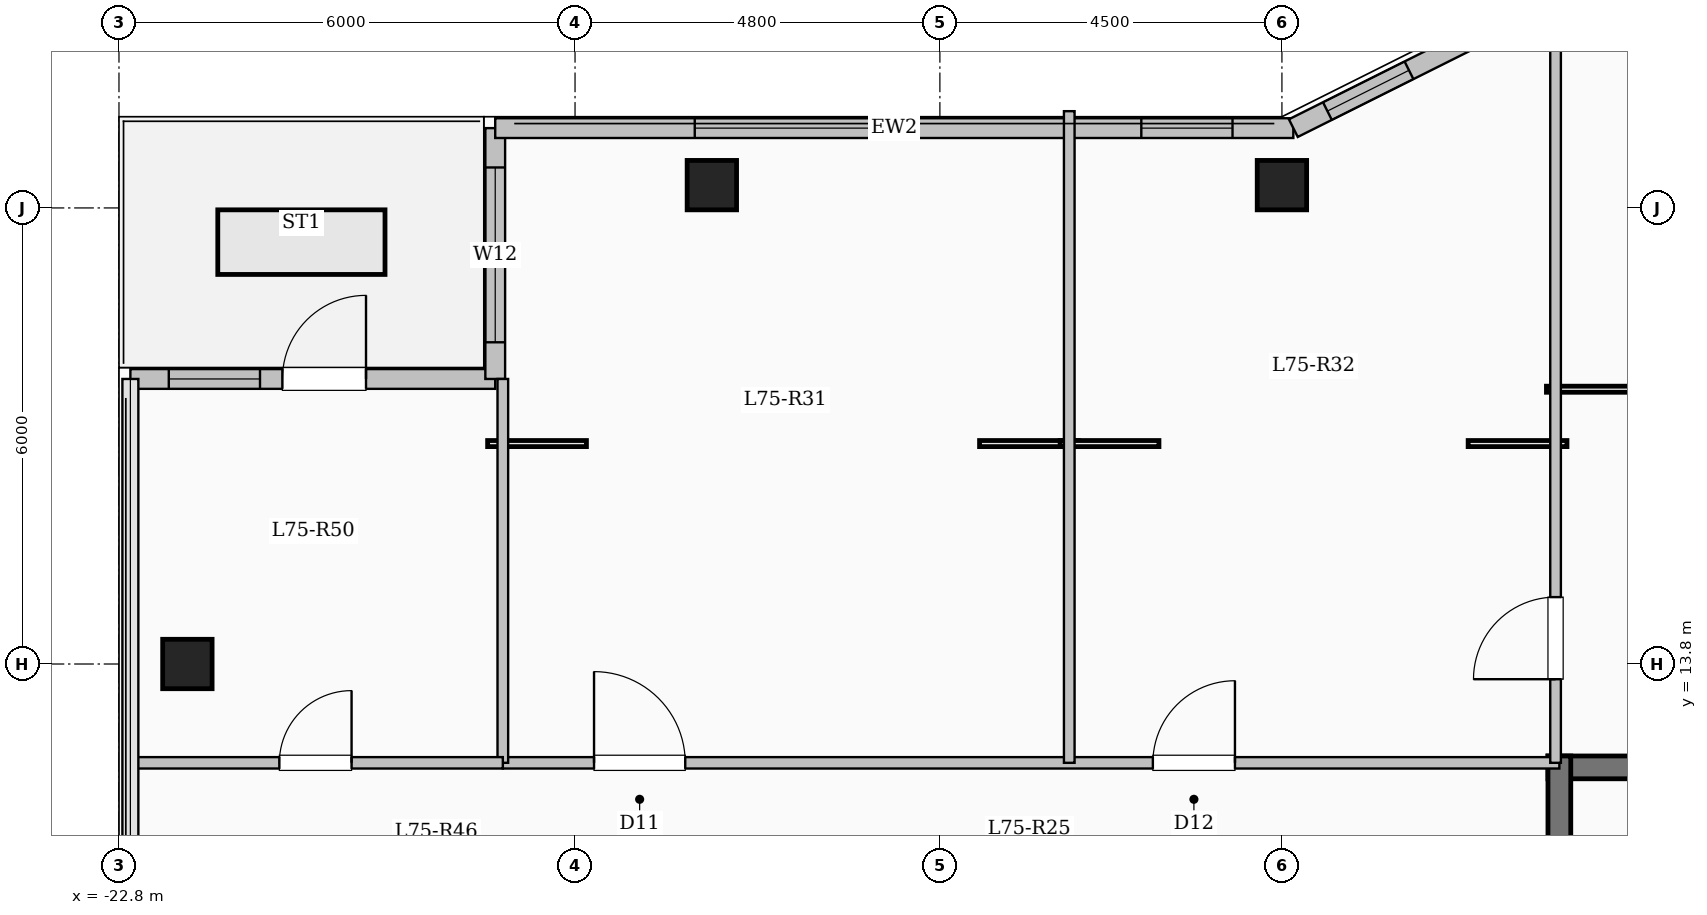
"""IFC4 building model, lengths in metres.
Left out: names, types, materials, properties, quantities, classifications, styles, units other than length and angle.
Written with IfcOpenShell. Run it as: python <this file> out.ifc"""

import sys

from ifc_helpers import new_model, si_unit, direction, frame, frame_2d, origin, origin_2d, place, context, subcontext, project, spatial, rectangle, extrude, element, fill, save


model = new_model("IFC4")
c1 = context("Model", 3, precision=1e-05, world=origin(), true_north=direction((0.0, 1.0)))
c2 = subcontext(c1, "Body", "Model", "MODEL_VIEW")
j1 = project(units=[si_unit("LENGTHUNIT", "METRE"), si_unit("PLANEANGLEUNIT", "RADIAN")], contexts=[c1])
p1 = place(None, origin())
s1 = spatial("IfcSite", under=j1, at=p1, CompositionType="ELEMENT")
p2 = place(p1, origin())
s2 = spatial("IfcBuilding", under=s1, at=p2, CompositionType="ELEMENT")
p3 = place(p2, frame((0.0, 0.0, 276.3)))
s3 = spatial("IfcBuildingStorey", under=s2, at=p3, CompositionType="ELEMENT", Elevation=276.3)
for number, where, z_axis, x_axis in (
    (1, (-15.0, 20.1, 0.0), (0.0, 0.0, 1.0), (1.0, 0.0, 0.0)),
    (2, (-7.5, 20.1, 0.0), (0.0, 0.0, 1.0), (1.0, 0.0, 0.0)),
    (3, (-21.9, 13.8, 0.0), (0.0, 0.0, 1.0), (1.0, 0.0, 0.0)),
):
    element("IfcColumn", number, at=place(p3, frame(where, z_axis=z_axis, x_axis=x_axis)), inside=s3, PredefinedType="COLUMN", context=c2, shape_type="SweptSolid", body=[
        extrude(rectangle(XDim=0.65, YDim=0.65, at=origin_2d()), origin(), (0.0, 0.0, 1.0), 5.25),
    ])
p4 = place(p3, frame((-22.65, 17.55, 0.0), z_axis=(0.0, 0.0, 1.0), x_axis=(1.0, 0.0, 0.0)))
e4 = element("IfcWall", 4, at=p4, inside=s3, PredefinedType="SOLIDWALL", context=c2, shape_type="SweptSolid", body=[
    extrude(rectangle(XDim=4.8, YDim=0.26, at=frame_2d((2.4, 0.0))), origin(), (0.0, 0.0, 1.0), 4.95),
])
p5 = place(p4, frame((2.0, 0.0, 0.0)))
e5 = element("IfcOpeningElement", 5, at=p5, cuts=e4, PredefinedType="OPENING", context=c2, shape_type="SweptSolid", body=[
    extrude(rectangle(XDim=1.1, YDim=2.2, at=frame_2d((0.55, 1.1))), frame((0.0, 0.14, 0.0), z_axis=(0.0, -1.0, 0.0), x_axis=(1.0, 0.0, 0.0)), (0.0, 0.0, 1.0), 0.28),
])
p6 = place(p4, frame((0.505, 0.0, 0.95)))
e6 = element("IfcOpeningElement", 6, at=p6, cuts=e4, PredefinedType="OPENING", context=c2, shape_type="SweptSolid", body=[
    extrude(rectangle(XDim=1.2, YDim=1.5, at=frame_2d((0.6, 0.75))), frame((0.0, 0.14, 0.0), z_axis=(0.0, -1.0, 0.0), x_axis=(1.0, 0.0, 0.0)), (0.0, 0.0, 1.0), 0.28),
])
p7 = place(p3, frame((-17.85, 17.55, 0.0), z_axis=(0.0, 0.0, 1.0), x_axis=(0.0, 1.0, 0.0)))
e7 = element("IfcWall", 7, at=p7, inside=s3, PredefinedType="SOLIDWALL", context=c2, shape_type="SweptSolid", body=[
    extrude(rectangle(XDim=3.3, YDim=0.26, at=frame_2d((1.65, 0.0))), origin(), (0.0, 0.0, 1.0), 4.95),
])
p8 = place(p7, frame((0.482, 0.0, 0.85)))
e8 = element("IfcOpeningElement", 8, at=p8, cuts=e7, PredefinedType="OPENING", context=c2, shape_type="SweptSolid", body=[
    extrude(rectangle(XDim=2.3, YDim=2.2, at=frame_2d((1.15, 1.1))), frame((0.0, 0.14, 0.0), z_axis=(0.0, -1.0, 0.0), x_axis=(1.0, 0.0, 0.0)), (0.0, 0.0, 1.0), 0.28),
])
p9 = place(p3, frame((-17.85, 20.85, 0.0), z_axis=(0.0, 0.0, 1.0), x_axis=(1.0, 0.0, 0.0)))
e9 = element("IfcWall", 9, at=p9, inside=s3, PredefinedType="SOLIDWALL", context=c2, shape_type="SweptSolid", body=[
    extrude(rectangle(XDim=10.5, YDim=0.26, at=frame_2d((5.25, 0.0))), origin(), (0.0, 0.0, 1.0), 4.95),
])
p10 = place(p9, frame((2.625, 0.0, 0.85)))
e10 = element("IfcOpeningElement", 10, at=p10, cuts=e9, PredefinedType="OPENING", context=c2, shape_type="SweptSolid", body=[
    extrude(rectangle(XDim=2.3, YDim=2.2, at=frame_2d((1.15, 1.1))), frame((0.0, 0.14, 0.0), z_axis=(0.0, -1.0, 0.0), x_axis=(1.0, 0.0, 0.0)), (0.0, 0.0, 1.0), 0.28),
])
p11 = place(p9, frame((8.5, 0.0, 0.95)))
e11 = element("IfcOpeningElement", 11, at=p11, cuts=e9, PredefinedType="OPENING", context=c2, shape_type="SweptSolid", body=[
    extrude(rectangle(XDim=1.2, YDim=1.5, at=frame_2d((0.6, 0.75))), frame((0.0, 0.14, 0.0), z_axis=(0.0, -1.0, 0.0), x_axis=(1.0, 0.0, 0.0)), (0.0, 0.0, 1.0), 0.28),
])
p12 = place(p3, frame((-7.35, 20.85, 0.0), z_axis=(0.0, 0.0, 1.0), x_axis=(0.894427191, 0.4472135955, 0.0)))
e12 = element("IfcWall", 12, at=p12, inside=s3, PredefinedType="SOLIDWALL", context=c2, shape_type="SweptSolid", body=[
    extrude(rectangle(XDim=3.354, YDim=0.26, at=frame_2d((1.677, 0.0))), origin(), (0.0, 0.0, 1.0), 4.95),
])
p13 = place(p12, frame((0.501, 0.0, 0.95)))
e13 = element("IfcOpeningElement", 13, at=p13, cuts=e12, PredefinedType="OPENING", context=c2, shape_type="SweptSolid", body=[
    extrude(rectangle(XDim=1.2, YDim=1.5, at=frame_2d((0.6, 0.75))), frame((0.0, 0.14, 0.0), z_axis=(0.0, -1.0, 0.0), x_axis=(1.0, 0.0, 0.0)), (0.0, 0.0, 1.0), 0.28),
])
p14 = place(p3, frame((-4.0, 12.44, 0.0), z_axis=(0.0, 0.0, 1.0), x_axis=(1.0, 0.0, 0.0)))
e14 = element("IfcWall", 14, at=p14, inside=s3, PredefinedType="SHEAR", context=c2, shape_type="SweptSolid", body=[
    extrude(rectangle(XDim=8.0, YDim=0.3, at=frame_2d((4.0, 0.0))), origin(), (0.0, 0.0, 1.0), 5.25),
])
p15 = place(p3, frame((-3.85, 9.0, 0.0), z_axis=(0.0, 0.0, 1.0), x_axis=(0.0, 1.0, 0.0)))
e15 = element("IfcWall", 15, at=p15, inside=s3, PredefinedType="SHEAR", context=c2, shape_type="SweptSolid", body=[
    extrude(rectangle(XDim=3.59, YDim=0.3, at=frame_2d((1.795, 0.0))), origin(), (0.0, 0.0, 1.0), 5.25),
])
p16 = place(p3, frame((-17.75, 12.5, 0.0), z_axis=(0.0, 0.0, 1.0), x_axis=(1.0, 0.0, 0.0)))
e16 = element("IfcWall", 16, at=p16, inside=s3, PredefinedType="PARTITIONING", context=c2, shape_type="SweptSolid", body=[
    extrude(rectangle(XDim=13.9, YDim=0.15, at=frame_2d((6.95, 0.0))), origin(), (0.0, 0.0, 1.0), 4.95),
])
p17 = place(p16, frame((1.2, 0.0, 0.0)))
e17 = element("IfcOpeningElement", 17, at=p17, cuts=e16, PredefinedType="OPENING", context=c2, shape_type="SweptSolid", body=[
    extrude(rectangle(XDim=1.2, YDim=2.15, at=frame_2d((0.6, 1.075))), frame((0.0, 0.085, 0.0), z_axis=(0.0, -1.0, 0.0), x_axis=(1.0, 0.0, 0.0)), (0.0, 0.0, 1.0), 0.17),
])
p18 = place(p16, frame((8.552, 0.0, 0.0)))
e18 = element("IfcOpeningElement", 18, at=p18, cuts=e16, PredefinedType="OPENING", context=c2, shape_type="SweptSolid", body=[
    extrude(rectangle(XDim=1.08, YDim=2.15, at=frame_2d((0.54, 1.075))), frame((0.0, 0.085, 0.0), z_axis=(0.0, -1.0, 0.0), x_axis=(1.0, 0.0, 0.0)), (0.0, 0.0, 1.0), 0.17),
])
p19 = place(p3, frame((-3.9, 12.5, 0.0), z_axis=(0.0, 0.0, 1.0), x_axis=(0.0, 1.0, 0.0)))
e19 = element("IfcWall", 19, at=p19, inside=s3, PredefinedType="PARTITIONING", context=c2, shape_type="SweptSolid", body=[
    extrude(rectangle(XDim=9.88, YDim=0.14, at=frame_2d((4.94, 0.0))), origin(), (0.0, 0.0, 1.0), 4.95),
])
p20 = place(p19, frame((1.1, 0.0, 0.0)))
e20 = element("IfcOpeningElement", 20, at=p20, cuts=e19, PredefinedType="OPENING", context=c2, shape_type="SweptSolid", body=[
    extrude(rectangle(XDim=1.08, YDim=2.15, at=frame_2d((0.54, 1.075))), frame((0.0, 0.08, 0.0), z_axis=(0.0, -1.0, 0.0), x_axis=(1.0, 0.0, 0.0)), (0.0, 0.0, 1.0), 0.16),
])
p21 = place(p3, frame((-10.298, 12.5, 0.0), z_axis=(0.0, 0.0, 1.0), x_axis=(0.0, 1.0, 0.0)))
e21 = element("IfcWall", 21, at=p21, inside=s3, PredefinedType="PARTITIONING", context=c2, shape_type="SweptSolid", body=[
    extrude(rectangle(XDim=8.573, YDim=0.14, at=frame_2d((4.287, 0.0))), origin(), (0.0, 0.0, 1.0), 4.95),
])
p22 = place(p3, frame((-17.75, 12.5, 0.0), z_axis=(0.0, 0.0, 1.0), x_axis=(0.0, 1.0, 0.0)))
e22 = element("IfcWall", 22, at=p22, inside=s3, PredefinedType="PARTITIONING", context=c2, shape_type="SweptSolid", body=[
    extrude(rectangle(XDim=5.05, YDim=0.14, at=frame_2d((2.525, 0.0))), origin(), (0.0, 0.0, 1.0), 4.95),
])
p23 = place(p3, frame((-22.68, 12.5, 0.0), z_axis=(0.0, 0.0, 1.0), x_axis=(1.0, 0.0, 0.0)))
e23 = element("IfcWall", 23, at=p23, inside=s3, PredefinedType="PARTITIONING", context=c2, shape_type="SweptSolid", body=[
    extrude(rectangle(XDim=4.93, YDim=0.15, at=frame_2d((2.465, 0.0))), origin(), (0.0, 0.0, 1.0), 4.95),
])
p24 = place(p23, frame((1.99, 0.0, 0.0)))
e24 = element("IfcOpeningElement", 24, at=p24, cuts=e23, PredefinedType="OPENING", context=c2, shape_type="SweptSolid", body=[
    extrude(rectangle(XDim=0.95, YDim=2.15, at=frame_2d((0.475, 1.075))), frame((0.0, 0.085, 0.0), z_axis=(0.0, -1.0, 0.0), x_axis=(1.0, 0.0, 0.0)), (0.0, 0.0, 1.0), 0.17),
])
p25 = place(p5, origin())
e25 = element("IfcDoor", 25, at=p25, inside=s3, OperationType="SINGLE_SWING_RIGHT", PredefinedType="DOOR", context=c2, shape_type="SweptSolid", body=[
    extrude(rectangle(XDim=1.1, YDim=2.2, at=frame_2d((0.55, 1.1))), frame((0.0, 0.025, 0.0), z_axis=(0.0, -1.0, 0.0), x_axis=(1.0, 0.0, 0.0)), (0.0, 0.0, 1.0), 0.05),
])
fill(e5, e25)
p26 = place(p6, origin())
e26 = element("IfcWindow", 26, at=p26, inside=s3, PartitioningType="SINGLE_PANEL", PredefinedType="WINDOW", context=c2, shape_type="SweptSolid", body=[
    extrude(rectangle(XDim=1.2, YDim=1.5, at=frame_2d((0.6, 0.75))), frame((0.0, 0.03, 0.0), z_axis=(0.0, -1.0, 0.0), x_axis=(1.0, 0.0, 0.0)), (0.0, 0.0, 1.0), 0.06),
])
fill(e6, e26)
p27 = place(p8, origin())
e27 = element("IfcWindow", 27, at=p27, inside=s3, PartitioningType="SINGLE_PANEL", PredefinedType="WINDOW", context=c2, shape_type="SweptSolid", body=[
    extrude(rectangle(XDim=2.3, YDim=2.2, at=frame_2d((1.15, 1.1))), frame((0.0, 0.03, 0.0), z_axis=(0.0, -1.0, 0.0), x_axis=(1.0, 0.0, 0.0)), (0.0, 0.0, 1.0), 0.06),
])
fill(e8, e27)
p28 = place(p10, origin())
e28 = element("IfcWindow", 28, at=p28, inside=s3, PartitioningType="SINGLE_PANEL", PredefinedType="WINDOW", context=c2, shape_type="SweptSolid", body=[
    extrude(rectangle(XDim=2.3, YDim=2.2, at=frame_2d((1.15, 1.1))), frame((0.0, 0.03, 0.0), z_axis=(0.0, -1.0, 0.0), x_axis=(1.0, 0.0, 0.0)), (0.0, 0.0, 1.0), 0.06),
])
fill(e10, e28)
p29 = place(p11, origin())
e29 = element("IfcWindow", 29, at=p29, inside=s3, PartitioningType="SINGLE_PANEL", PredefinedType="WINDOW", context=c2, shape_type="SweptSolid", body=[
    extrude(rectangle(XDim=1.2, YDim=1.5, at=frame_2d((0.6, 0.75))), frame((0.0, 0.03, 0.0), z_axis=(0.0, -1.0, 0.0), x_axis=(1.0, 0.0, 0.0)), (0.0, 0.0, 1.0), 0.06),
])
fill(e11, e29)
p30 = place(p13, origin())
e30 = element("IfcWindow", 30, at=p30, inside=s3, PartitioningType="SINGLE_PANEL", PredefinedType="WINDOW", context=c2, shape_type="SweptSolid", body=[
    extrude(rectangle(XDim=1.2, YDim=1.5, at=frame_2d((0.6, 0.75))), frame((0.0, 0.03, 0.0), z_axis=(0.0, -1.0, 0.0), x_axis=(1.0, 0.0, 0.0)), (0.0, 0.0, 1.0), 0.06),
])
fill(e13, e30)
p31 = place(p17, origin())
e31 = element("IfcDoor", 31, at=p31, inside=s3, OperationType="SINGLE_SWING_LEFT", PredefinedType="DOOR", context=c2, shape_type="SweptSolid", body=[
    extrude(rectangle(XDim=1.2, YDim=2.15, at=frame_2d((0.6, 1.075))), frame((0.0, 0.025, 0.0), z_axis=(0.0, -1.0, 0.0), x_axis=(1.0, 0.0, 0.0)), (0.0, 0.0, 1.0), 0.05),
])
fill(e17, e31)
p32 = place(p18, origin())
e32 = element("IfcDoor", 32, at=p32, inside=s3, OperationType="SINGLE_SWING_RIGHT", PredefinedType="DOOR", context=c2, shape_type="SweptSolid", body=[
    extrude(rectangle(XDim=1.08, YDim=2.15, at=frame_2d((0.54, 1.075))), frame((0.0, 0.025, 0.0), z_axis=(0.0, -1.0, 0.0), x_axis=(1.0, 0.0, 0.0)), (0.0, 0.0, 1.0), 0.05),
])
fill(e18, e32)
p33 = place(p20, origin())
e33 = element("IfcDoor", 33, at=p33, inside=s3, OperationType="SINGLE_SWING_LEFT", PredefinedType="DOOR", context=c2, shape_type="SweptSolid", body=[
    extrude(rectangle(XDim=1.08, YDim=2.15, at=frame_2d((0.54, 1.075))), frame((0.0, 0.025, 0.0), z_axis=(0.0, -1.0, 0.0), x_axis=(1.0, 0.0, 0.0)), (0.0, 0.0, 1.0), 0.05),
])
fill(e20, e33)
p34 = place(p24, origin())
e34 = element("IfcDoor", 34, at=p34, inside=s3, OperationType="SINGLE_SWING_RIGHT", PredefinedType="DOOR", context=c2, shape_type="SweptSolid", body=[
    extrude(rectangle(XDim=0.95, YDim=2.15, at=frame_2d((0.475, 1.075))), frame((0.0, 0.025, 0.0), z_axis=(0.0, -1.0, 0.0), x_axis=(1.0, 0.0, 0.0)), (0.0, 0.0, 1.0), 0.05),
])
fill(e24, e34)
save(model, sys.argv[1])
